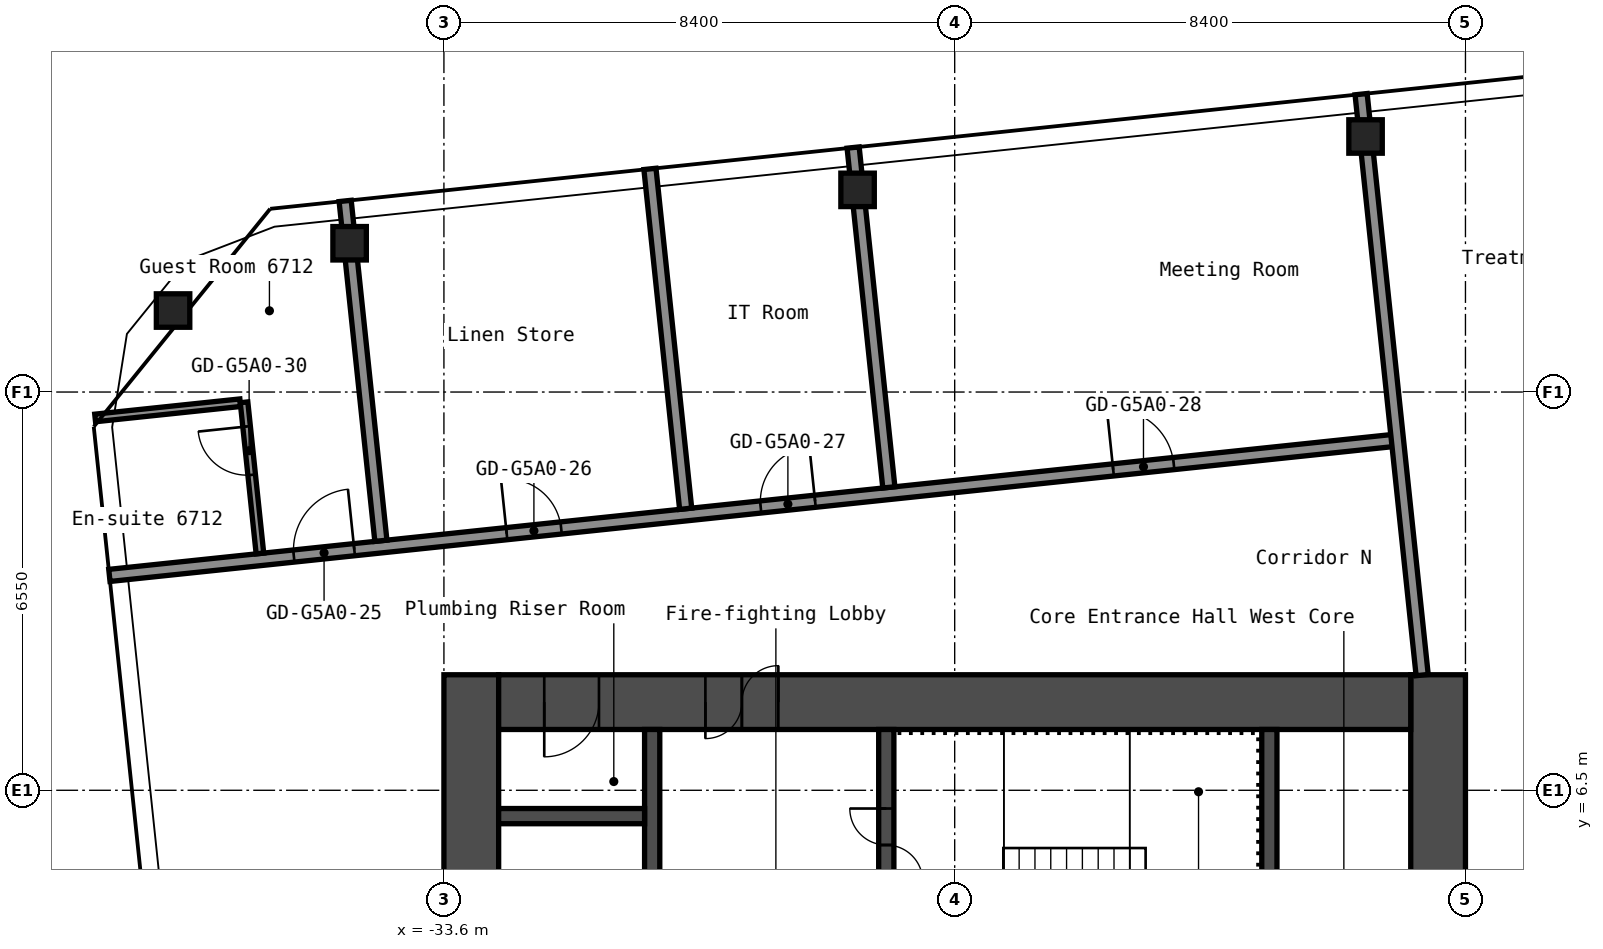
"""IFC4 building model, lengths in metres.
Left out: names, types, materials, properties, quantities, classifications, styles, units other than length and angle.
Written with IfcOpenShell. Run it as: python <this file> out.ifc"""

import sys

from ifc_helpers import new_model, si_unit, direction, frame, frame_2d, origin, origin_2d, place, context, subcontext, project, spatial, rectangle, hollow_rectangle, extrude, element, fill, save


model = new_model("IFC4")
c1 = context("Model", 3, precision=1e-05, world=origin(), true_north=direction((0.0, 1.0)))
c2 = subcontext(c1, "Body", "Model", "MODEL_VIEW")
j1 = project(units=[si_unit("LENGTHUNIT", "METRE"), si_unit("PLANEANGLEUNIT", "RADIAN")], contexts=[c1])
p1 = place(None, origin())
s1 = spatial("IfcSite", under=j1, at=p1, CompositionType="ELEMENT")
p2 = place(p1, origin())
s2 = spatial("IfcBuilding", under=s1, at=p2, CompositionType="ELEMENT")
p3 = place(p2, frame((0.0, 0.0, 239.0)))
s3 = spatial("IfcBuildingStorey", under=s2, at=p3, CompositionType="ELEMENT", Elevation=239.0)
for number, where, z_axis, x_axis in (
    (1, (-38.054, 14.39, 0.0), (0.0, 0.0, 1.0), (1.0, 0.0, 0.0)),
    (2, (-35.151, 15.497, 0.0), (0.0, 0.0, 1.0), (1.0, 0.0, 0.0)),
    (3, (-26.797, 16.375, 0.0), (0.0, 0.0, 1.0), (1.0, 0.0, 0.0)),
    (4, (-18.443, 17.253, 0.0), (0.0, 0.0, 1.0), (1.0, 0.0, 0.0)),
):
    element("IfcColumn", number, at=place(p3, frame(where, z_axis=z_axis, x_axis=x_axis)), inside=s3, PredefinedType="COLUMN", context=c2, shape_type="SweptSolid", body=[
        extrude(hollow_rectangle(XDim=0.55, YDim=0.55, WallThickness=0.022, InnerFilletRadius=0.033, OuterFilletRadius=0.055, at=origin_2d()), origin(), (0.0, 0.0, 1.0), 2.75),
    ])
p4 = place(p3, frame((-17.25, -8.4, 0.0), z_axis=(0.0, 0.0, 1.0), x_axis=(0.0, 1.0, 0.0)))
e5 = element("IfcWall", 5, at=p4, inside=s3, PredefinedType="SHEAR", context=c2, shape_type="SweptSolid", body=[
    extrude(rectangle(XDim=16.8, YDim=0.9, at=frame_2d((8.4, 0.0))), origin(), (0.0, 0.0, 1.0), 2.75),
])
p5 = place(p4, frame((8.321, 0.0, 0.0)))
e6 = element("IfcOpeningElement", 6, at=p5, cuts=e5, PredefinedType="OPENING", context=c2, shape_type="SweptSolid", body=[
    extrude(rectangle(XDim=1.6, YDim=2.1, at=frame_2d((0.8, 1.05))), frame((0.0, 0.46, 0.0), z_axis=(0.0, -1.0, 0.0), x_axis=(1.0, 0.0, 0.0)), (0.0, 0.0, 1.0), 0.92),
])
p6 = place(p3, frame((-33.15, -8.4, 0.0), z_axis=(0.0, 0.0, 1.0), x_axis=(0.0, 1.0, 0.0)))
e7 = element("IfcWall", 7, at=p6, inside=s3, PredefinedType="SHEAR", context=c2, shape_type="SweptSolid", body=[
    extrude(rectangle(XDim=16.8, YDim=0.9, at=frame_2d((8.4, 0.0))), origin(), (0.0, 0.0, 1.0), 2.75),
])
p7 = place(p3, frame((-32.7, 7.95, 0.0), z_axis=(0.0, 0.0, 1.0), x_axis=(1.0, 0.0, 0.0)))
e8 = element("IfcWall", 8, at=p7, inside=s3, PredefinedType="SHEAR", context=c2, shape_type="SweptSolid", body=[
    extrude(rectangle(XDim=15.0, YDim=0.9, at=frame_2d((7.5, 0.0))), origin(), (0.0, 0.0, 1.0), 2.75),
])
p8 = place(p7, frame((3.4, 0.0, 0.0)))
e9 = element("IfcOpeningElement", 9, at=p8, cuts=e8, PredefinedType="OPENING", context=c2, shape_type="SweptSolid", body=[
    extrude(rectangle(XDim=1.2, YDim=2.1, at=frame_2d((0.6, 1.05))), frame((0.0, 0.46, 0.0), z_axis=(0.0, -1.0, 0.0), x_axis=(1.0, 0.0, 0.0)), (0.0, 0.0, 1.0), 0.92),
])
p9 = place(p7, frame((0.75, 0.0, 0.0)))
e10 = element("IfcOpeningElement", 10, at=p9, cuts=e8, PredefinedType="OPENING", context=c2, shape_type="SweptSolid", body=[
    extrude(rectangle(XDim=0.9, YDim=2.1, at=frame_2d((0.45, 1.05))), frame((0.0, 0.46, 0.0), z_axis=(0.0, -1.0, 0.0), x_axis=(1.0, 0.0, 0.0)), (0.0, 0.0, 1.0), 0.92),
])
p10 = place(p3, frame((-20.025, 1.2, 0.0), z_axis=(0.0, 0.0, 1.0), x_axis=(0.0, 1.0, 0.0)))
e11 = element("IfcWall", 11, at=p10, inside=s3, PredefinedType="SHEAR", context=c2, shape_type="SweptSolid", body=[
    extrude(rectangle(XDim=6.3, YDim=0.25, at=frame_2d((3.15, 0.0))), origin(), (0.0, 0.0, 1.0), 2.75),
])
p11 = place(p3, frame((-26.325, 3.75, 0.0), z_axis=(0.0, 0.0, 1.0), x_axis=(0.0, 1.0, 0.0)))
e12 = element("IfcWall", 12, at=p11, inside=s3, PredefinedType="SHEAR", context=c2, shape_type="SweptSolid", body=[
    extrude(rectangle(XDim=3.75, YDim=0.25, at=frame_2d((1.875, 0.0))), origin(), (0.0, 0.0, 1.0), 2.75),
])
p12 = place(p11, frame((1.25, 0.0, 0.0)))
e13 = element("IfcOpeningElement", 13, at=p12, cuts=e12, PredefinedType="OPENING", context=c2, shape_type="SweptSolid", body=[
    extrude(rectangle(XDim=1.2, YDim=2.1, at=frame_2d((0.6, 1.05))), frame((0.0, 0.135, 0.0), z_axis=(0.0, -1.0, 0.0), x_axis=(1.0, 0.0, 0.0)), (0.0, 0.0, 1.0), 0.27),
])
p13 = place(p3, frame((-30.175, 1.45, 0.0), z_axis=(0.0, 0.0, 1.0), x_axis=(0.0, 1.0, 0.0)))
e14 = element("IfcWall", 14, at=p13, inside=s3, PredefinedType="SHEAR", context=c2, shape_type="SweptSolid", body=[
    extrude(rectangle(XDim=6.05, YDim=0.25, at=frame_2d((3.025, 0.0))), origin(), (0.0, 0.0, 1.0), 2.75),
])
p14 = place(p13, frame((2.625, 0.0, 0.0)))
e15 = element("IfcOpeningElement", 15, at=p14, cuts=e14, PredefinedType="OPENING", context=c2, shape_type="SweptSolid", body=[
    extrude(rectangle(XDim=1.1, YDim=2.1, at=frame_2d((0.55, 1.05))), frame((0.0, 0.135, 0.0), z_axis=(0.0, -1.0, 0.0), x_axis=(1.0, 0.0, 0.0)), (0.0, 0.0, 1.0), 0.27),
])
p15 = place(p3, frame((-32.7, 6.075, 0.0), z_axis=(0.0, 0.0, 1.0), x_axis=(1.0, 0.0, 0.0)))
e16 = element("IfcWall", 16, at=p15, inside=s3, PredefinedType="SHEAR", context=c2, shape_type="SweptSolid", body=[
    extrude(rectangle(XDim=2.4, YDim=0.25, at=frame_2d((1.2, 0.0))), origin(), (0.0, 0.0, 1.0), 2.75),
])
p16 = place(p3, frame((-16.805, 2.041, 0.0), z_axis=(0.0, 0.0, 1.0), x_axis=(0.994521146831, 0.104535584879, 0.0)))
e17 = element("IfcWall", 17, at=p16, inside=s3, PredefinedType="PARTITIONING", context=c2, shape_type="SweptSolid", body=[
    extrude(rectangle(XDim=33.561, YDim=0.2, at=frame_2d((16.78, 0.0))), origin(), (0.0, 0.0, 1.0), 2.75),
])
p17 = place(p16, frame((2.201, 0.0, 0.0)))
e18 = element("IfcOpeningElement", 18, at=p17, cuts=e17, PredefinedType="OPENING", context=c2, shape_type="SweptSolid", body=[
    extrude(rectangle(XDim=0.9, YDim=2.1, at=frame_2d((0.45, 1.05))), frame((0.0, 0.11, 0.0), z_axis=(0.0, -1.0, 0.0), x_axis=(1.0, 0.0, 0.0)), (0.0, 0.0, 1.0), 0.22),
])
p18 = place(p16, frame((6.401, 0.0, 0.0)))
e19 = element("IfcOpeningElement", 19, at=p18, cuts=e17, PredefinedType="OPENING", context=c2, shape_type="SweptSolid", body=[
    extrude(rectangle(XDim=0.9, YDim=2.1, at=frame_2d((0.45, 1.05))), frame((0.0, 0.11, 0.0), z_axis=(0.0, -1.0, 0.0), x_axis=(1.0, 0.0, 0.0)), (0.0, 0.0, 1.0), 0.22),
])
p19 = place(p16, frame((10.516, 0.0, 0.0)))
e20 = element("IfcOpeningElement", 20, at=p19, cuts=e17, PredefinedType="OPENING", context=c2, shape_type="SweptSolid", body=[
    extrude(rectangle(XDim=0.9, YDim=2.1, at=frame_2d((0.45, 1.05))), frame((0.0, 0.11, 0.0), z_axis=(0.0, -1.0, 0.0), x_axis=(1.0, 0.0, 0.0)), (0.0, 0.0, 1.0), 0.22),
])
p20 = place(p16, frame((14.716, 0.0, 0.0)))
e21 = element("IfcOpeningElement", 21, at=p20, cuts=e17, PredefinedType="OPENING", context=c2, shape_type="SweptSolid", body=[
    extrude(rectangle(XDim=0.9, YDim=2.1, at=frame_2d((0.45, 1.05))), frame((0.0, 0.11, 0.0), z_axis=(0.0, -1.0, 0.0), x_axis=(1.0, 0.0, 0.0)), (0.0, 0.0, 1.0), 0.22),
])
p21 = place(p16, frame((18.241, 0.0, 0.0)))
e22 = element("IfcOpeningElement", 22, at=p21, cuts=e17, PredefinedType="OPENING", context=c2, shape_type="SweptSolid", body=[
    extrude(rectangle(XDim=0.9, YDim=2.1, at=frame_2d((0.45, 1.05))), frame((0.0, 0.11, 0.0), z_axis=(0.0, -1.0, 0.0), x_axis=(1.0, 0.0, 0.0)), (0.0, 0.0, 1.0), 0.22),
])
p22 = place(p16, frame((22.441, 0.0, 0.0)))
e23 = element("IfcOpeningElement", 23, at=p22, cuts=e17, PredefinedType="OPENING", context=c2, shape_type="SweptSolid", body=[
    extrude(rectangle(XDim=0.9, YDim=2.1, at=frame_2d((0.45, 1.05))), frame((0.0, 0.11, 0.0), z_axis=(0.0, -1.0, 0.0), x_axis=(1.0, 0.0, 0.0)), (0.0, 0.0, 1.0), 0.22),
])
p23 = place(p16, frame((26.981, 0.0, 0.0)))
e24 = element("IfcOpeningElement", 24, at=p23, cuts=e17, PredefinedType="OPENING", context=c2, shape_type="SweptSolid", body=[
    extrude(rectangle(XDim=0.9, YDim=2.1, at=frame_2d((0.45, 1.05))), frame((0.0, 0.11, 0.0), z_axis=(0.0, -1.0, 0.0), x_axis=(1.0, 0.0, 0.0)), (0.0, 0.0, 1.0), 0.22),
])
p24 = place(p16, frame((31.181, 0.0, 0.0)))
e25 = element("IfcOpeningElement", 25, at=p24, cuts=e17, PredefinedType="OPENING", context=c2, shape_type="SweptSolid", body=[
    extrude(rectangle(XDim=0.9, YDim=2.1, at=frame_2d((0.45, 1.05))), frame((0.0, 0.11, 0.0), z_axis=(0.0, -1.0, 0.0), x_axis=(1.0, 0.0, 0.0)), (0.0, 0.0, 1.0), 0.22),
])
p25 = place(p3, frame((-39.102, 10.034, 0.0), z_axis=(0.0, 0.0, 1.0), x_axis=(0.994522585465, 0.104521897229, 0.0)))
e26 = element("IfcWall", 26, at=p25, inside=s3, PredefinedType="PARTITIONING", context=c2, shape_type="SweptSolid", body=[
    extrude(rectangle(XDim=21.3, YDim=0.2, at=frame_2d((10.65, 0.0))), origin(), (0.0, 0.0, 1.0), 2.75),
])
p26 = place(p25, frame((3.05, 0.0, 0.0)))
e27 = element("IfcOpeningElement", 27, at=p26, cuts=e26, PredefinedType="OPENING", context=c2, shape_type="SweptSolid", body=[
    extrude(rectangle(XDim=1.0, YDim=2.1, at=frame_2d((0.5, 1.05))), frame((0.0, 0.11, 0.0), z_axis=(0.0, -1.0, 0.0), x_axis=(1.0, 0.0, 0.0)), (0.0, 0.0, 1.0), 0.22),
])
p27 = place(p25, frame((6.57, 0.0, 0.0)))
e28 = element("IfcOpeningElement", 28, at=p27, cuts=e26, PredefinedType="OPENING", context=c2, shape_type="SweptSolid", body=[
    extrude(rectangle(XDim=0.9, YDim=2.1, at=frame_2d((0.45, 1.05))), frame((0.0, 0.11, 0.0), z_axis=(0.0, -1.0, 0.0), x_axis=(1.0, 0.0, 0.0)), (0.0, 0.0, 1.0), 0.22),
])
p28 = place(p25, frame((10.77, 0.0, 0.0)))
e29 = element("IfcOpeningElement", 29, at=p28, cuts=e26, PredefinedType="OPENING", context=c2, shape_type="SweptSolid", body=[
    extrude(rectangle(XDim=0.9, YDim=2.1, at=frame_2d((0.45, 1.05))), frame((0.0, 0.11, 0.0), z_axis=(0.0, -1.0, 0.0), x_axis=(1.0, 0.0, 0.0)), (0.0, 0.0, 1.0), 0.22),
])
p29 = place(p25, frame((16.6, 0.0, 0.0)))
e30 = element("IfcOpeningElement", 30, at=p29, cuts=e26, PredefinedType="OPENING", context=c2, shape_type="SweptSolid", body=[
    extrude(rectangle(XDim=1.0, YDim=2.1, at=frame_2d((0.5, 1.05))), frame((0.0, 0.11, 0.0), z_axis=(0.0, -1.0, 0.0), x_axis=(1.0, 0.0, 0.0)), (0.0, 0.0, 1.0), 0.22),
])
p30 = place(p3, frame((-39.336, 12.624, 0.0), z_axis=(0.0, 0.0, 1.0), x_axis=(0.994528281662, 0.104467683877, 0.0)))
e31 = element("IfcWall", 31, at=p30, inside=s3, PredefinedType="PARTITIONING", context=c2, shape_type="SweptSolid", body=[
    extrude(rectangle(XDim=2.4, YDim=0.125, at=frame_2d((1.2, 0.0))), origin(), (0.0, 0.0, 1.0), 2.75),
])
p31 = place(p3, frame((-36.626, 10.395, 0.0), z_axis=(0.0, 0.0, 1.0), x_axis=(-0.104588199498, 0.994515615024, 0.0)))
e32 = element("IfcWall", 32, at=p31, inside=s3, PredefinedType="PARTITIONING", context=c2, shape_type="SweptSolid", body=[
    extrude(rectangle(XDim=2.5, YDim=0.125, at=frame_2d((1.25, 0.0))), origin(), (0.0, 0.0, 1.0), 2.75),
])
p32 = place(p31, frame((1.3, 0.0, 0.0)))
e33 = element("IfcOpeningElement", 33, at=p32, cuts=e32, PredefinedType="OPENING", context=c2, shape_type="SweptSolid", body=[
    extrude(rectangle(XDim=0.8, YDim=2.1, at=frame_2d((0.4, 1.05))), frame((0.0, 0.073, 0.0), z_axis=(0.0, -1.0, 0.0), x_axis=(1.0, 0.0, 0.0)), (0.0, 0.0, 1.0), 0.145),
])
p33 = place(p3, frame((-34.637, 10.604, 0.0), z_axis=(0.0, 0.0, 1.0), x_axis=(-0.104560413987, 0.994518536693, 0.0)))
e34 = element("IfcWall", 34, at=p33, inside=s3, PredefinedType="PARTITIONING", context=c2, shape_type="SweptSolid", body=[
    extrude(rectangle(XDim=5.62, YDim=0.2, at=frame_2d((2.81, 0.0))), origin(), (0.0, 0.0, 1.0), 2.75),
])
p34 = place(p3, frame((-29.625, 11.13, 0.0), z_axis=(0.0, 0.0, 1.0), x_axis=(-0.104512933269, 0.994523527514, 0.0)))
e35 = element("IfcWall", 35, at=p34, inside=s3, PredefinedType="PARTITIONING", context=c2, shape_type="SweptSolid", body=[
    extrude(rectangle(XDim=5.62, YDim=0.2, at=frame_2d((2.81, 0.0))), origin(), (0.0, 0.0, 1.0), 2.75),
])
p35 = place(p3, frame((-26.283, 11.482, 0.0), z_axis=(0.0, 0.0, 1.0), x_axis=(-0.104560413987, 0.994518536693, 0.0)))
e36 = element("IfcWall", 36, at=p35, inside=s3, PredefinedType="PARTITIONING", context=c2, shape_type="SweptSolid", body=[
    extrude(rectangle(XDim=5.62, YDim=0.2, at=frame_2d((2.81, 0.0))), origin(), (0.0, 0.0, 1.0), 2.75),
])
p36 = place(p3, frame((-17.512, 8.395, 0.0), z_axis=(0.0, 0.0, 1.0), x_axis=(-0.104524714473, 0.994522289375, 0.0)))
e37 = element("IfcWall", 37, at=p36, inside=s3, PredefinedType="PARTITIONING", context=c2, shape_type="SweptSolid", body=[
    extrude(rectangle(XDim=9.607, YDim=0.2, at=frame_2d((4.803, 0.0))), origin(), (0.0, 0.0, 1.0), 2.75),
])
p37 = place(p8, origin())
e38 = element("IfcDoor", 38, at=p37, inside=s3, OperationType="DOUBLE_DOOR_SINGLE_SWING", PredefinedType="DOOR", context=c2, shape_type="SweptSolid", body=[
    extrude(rectangle(XDim=1.2, YDim=2.1, at=frame_2d((0.6, 1.05))), frame((0.0, 0.025, 0.0), z_axis=(0.0, -1.0, 0.0), x_axis=(1.0, 0.0, 0.0)), (0.0, 0.0, 1.0), 0.05),
])
fill(e9, e38)
p38 = place(p9, origin())
e39 = element("IfcDoor", 39, at=p38, inside=s3, OperationType="SINGLE_SWING_LEFT", PredefinedType="DOOR", context=c2, shape_type="SweptSolid", body=[
    extrude(rectangle(XDim=0.9, YDim=2.1, at=frame_2d((0.45, 1.05))), frame((0.0, 0.025, 0.0), z_axis=(0.0, -1.0, 0.0), x_axis=(1.0, 0.0, 0.0)), (0.0, 0.0, 1.0), 0.05),
])
fill(e10, e39)
p39 = place(p12, origin())
e40 = element("IfcDoor", 40, at=p39, inside=s3, OperationType="DOUBLE_DOOR_SINGLE_SWING", PredefinedType="DOOR", context=c2, shape_type="SweptSolid", body=[
    extrude(rectangle(XDim=1.2, YDim=2.1, at=frame_2d((0.6, 1.05))), frame((0.0, 0.025, 0.0), z_axis=(0.0, -1.0, 0.0), x_axis=(1.0, 0.0, 0.0)), (0.0, 0.0, 1.0), 0.05),
])
fill(e13, e40)
p40 = place(p26, origin())
e41 = element("IfcDoor", 41, at=p40, inside=s3, OperationType="SINGLE_SWING_LEFT", PredefinedType="DOOR", context=c2, shape_type="SweptSolid", body=[
    extrude(rectangle(XDim=1.0, YDim=2.1, at=frame_2d((0.5, 1.05))), frame((0.0, 0.025, 0.0), z_axis=(0.0, -1.0, 0.0), x_axis=(1.0, 0.0, 0.0)), (0.0, 0.0, 1.0), 0.05),
])
fill(e27, e41)
p41 = place(p27, origin())
e42 = element("IfcDoor", 42, at=p41, inside=s3, OperationType="SINGLE_SWING_RIGHT", PredefinedType="DOOR", context=c2, shape_type="SweptSolid", body=[
    extrude(rectangle(XDim=0.9, YDim=2.1, at=frame_2d((0.45, 1.05))), frame((0.0, 0.025, 0.0), z_axis=(0.0, -1.0, 0.0), x_axis=(1.0, 0.0, 0.0)), (0.0, 0.0, 1.0), 0.05),
])
fill(e28, e42)
p42 = place(p28, origin())
e43 = element("IfcDoor", 43, at=p42, inside=s3, OperationType="SINGLE_SWING_LEFT", PredefinedType="DOOR", context=c2, shape_type="SweptSolid", body=[
    extrude(rectangle(XDim=0.9, YDim=2.1, at=frame_2d((0.45, 1.05))), frame((0.0, 0.025, 0.0), z_axis=(0.0, -1.0, 0.0), x_axis=(1.0, 0.0, 0.0)), (0.0, 0.0, 1.0), 0.05),
])
fill(e29, e43)
p43 = place(p29, origin())
e44 = element("IfcDoor", 44, at=p43, inside=s3, OperationType="SINGLE_SWING_RIGHT", PredefinedType="DOOR", context=c2, shape_type="SweptSolid", body=[
    extrude(rectangle(XDim=1.0, YDim=2.1, at=frame_2d((0.5, 1.05))), frame((0.0, 0.025, 0.0), z_axis=(0.0, -1.0, 0.0), x_axis=(1.0, 0.0, 0.0)), (0.0, 0.0, 1.0), 0.05),
])
fill(e30, e44)
p44 = place(p32, origin())
e45 = element("IfcDoor", 45, at=p44, inside=s3, OperationType="SINGLE_SWING_LEFT", PredefinedType="DOOR", context=c2, shape_type="SweptSolid", body=[
    extrude(rectangle(XDim=0.8, YDim=2.1, at=frame_2d((0.4, 1.05))), frame((0.0, 0.025, 0.0), z_axis=(0.0, -1.0, 0.0), x_axis=(1.0, 0.0, 0.0)), (0.0, 0.0, 1.0), 0.05),
])
fill(e33, e45)
save(model, sys.argv[1])
